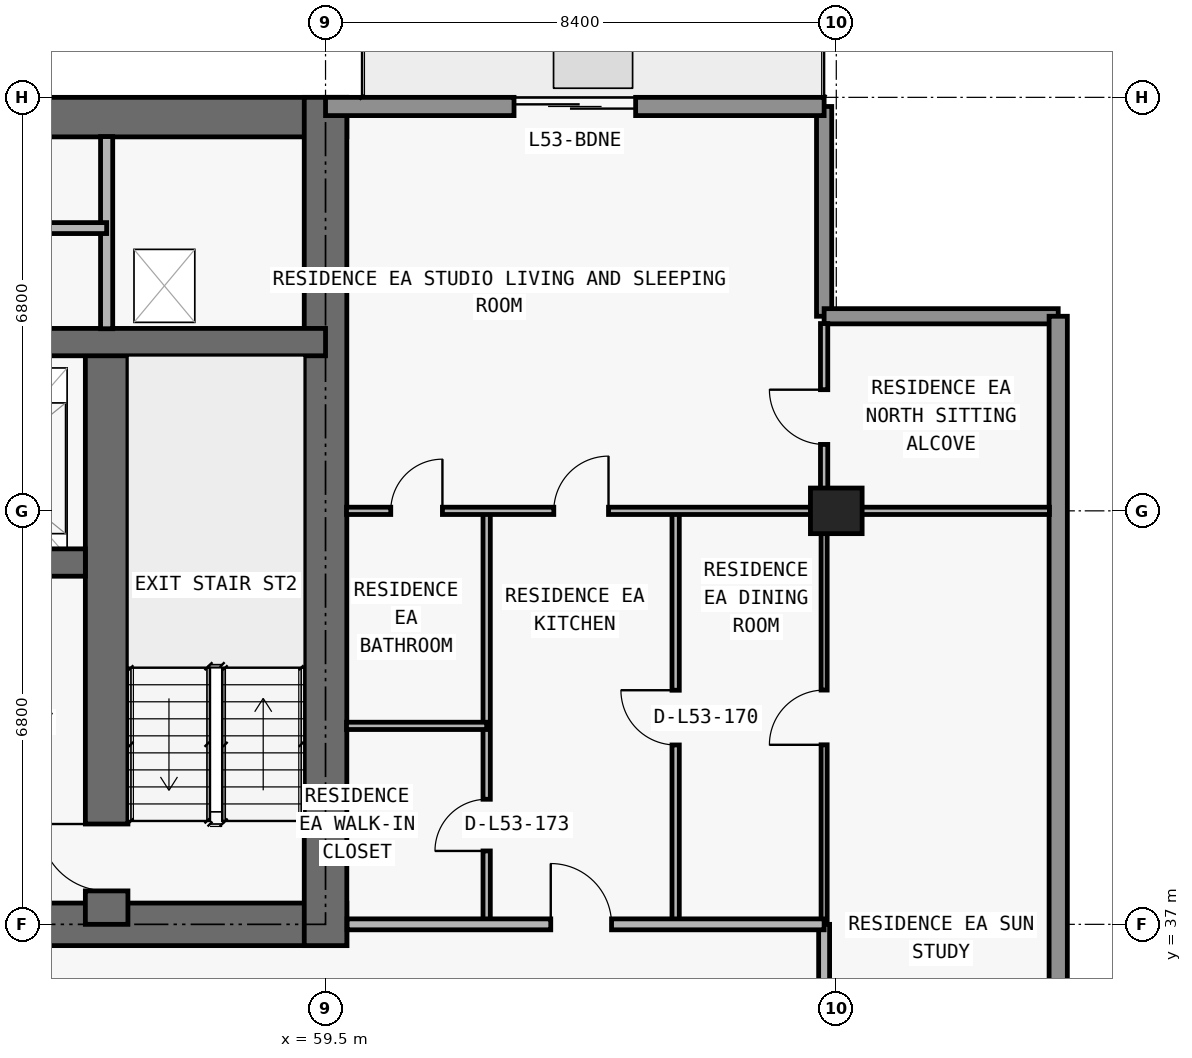
"""IFC4 building model, lengths in metres.
Left out: names, types, materials, properties, quantities, classifications, styles, units other than length and angle.
Written with IfcOpenShell. Run it as: python <this file> out.ifc"""

import sys

from ifc_helpers import new_model, si_unit, direction, frame, frame_2d, origin, origin_2d, place, context, subcontext, project, spatial, rectangle, extrude, element, fill, save


model = new_model("IFC4")
c1 = context("Model", 3, precision=1e-05, world=origin(), true_north=direction((0.0, 1.0)))
c2 = subcontext(c1, "Body", "Model", "MODEL_VIEW")
j1 = project(units=[si_unit("LENGTHUNIT", "METRE"), si_unit("PLANEANGLEUNIT", "RADIAN")], contexts=[c1])
p1 = place(None, origin())
s1 = spatial("IfcSite", under=j1, at=p1, CompositionType="ELEMENT")
p2 = place(p1, origin())
s2 = spatial("IfcBuilding", under=s1, at=p2, CompositionType="ELEMENT")
p3 = place(p2, frame((0.0, 0.0, 191.7)))
s3 = spatial("IfcBuildingStorey", under=s2, at=p3, CompositionType="ELEMENT", Elevation=191.7)
p4 = place(p3, frame((67.9, 43.8, 0.0), z_axis=(0.0, 0.0, 1.0), x_axis=(1.0, 0.0, 0.0)))
e1 = element("IfcColumn", 1, at=p4, inside=s3, PredefinedType="COLUMN", context=c2, shape_type="SweptSolid", body=[
    extrude(rectangle(XDim=0.85, YDim=0.75, at=origin_2d()), origin(), (0.0, 0.0, 1.0), 3.05),
])
p5 = place(p3, frame((17.95, 37.0, 0.0), z_axis=(0.0, 0.0, 1.0), x_axis=(1.0, 0.0, 0.0)))
e2 = element("IfcWall", 2, at=p5, inside=s3, PredefinedType="SHEAR", context=c2, shape_type="SweptSolid", body=[
    extrude(rectangle(XDim=41.9, YDim=0.7, at=frame_2d((20.95, 0.0))), origin(), (0.0, 0.0, 1.0), 3.05),
])
p6 = place(p5, frame((14.35, 0.0, 0.0)))
e3 = element("IfcOpeningElement", 3, at=p6, cuts=e2, PredefinedType="OPENING", context=c2, shape_type="SweptSolid", body=[
    extrude(rectangle(XDim=1.1, YDim=2.15, at=frame_2d((0.55, 1.075))), frame((0.0, 0.36, 0.0), z_axis=(0.0, -1.0, 0.0), x_axis=(1.0, 0.0, 0.0)), (0.0, 0.0, 1.0), 0.72),
])
p7 = place(p5, frame((6.2, 0.0, 0.0)))
e4 = element("IfcOpeningElement", 4, at=p7, cuts=e2, PredefinedType="OPENING", context=c2, shape_type="SweptSolid", body=[
    extrude(rectangle(XDim=1.05, YDim=2.15, at=frame_2d((0.525, 1.075))), frame((0.0, 0.36, 0.0), z_axis=(0.0, -1.0, 0.0), x_axis=(1.0, 0.0, 0.0)), (0.0, 0.0, 1.0), 0.72),
])
p8 = place(p5, frame((34.7, 0.0, 0.0)))
e5 = element("IfcOpeningElement", 5, at=p8, cuts=e2, PredefinedType="OPENING", context=c2, shape_type="SweptSolid", body=[
    extrude(rectangle(XDim=1.05, YDim=2.15, at=frame_2d((0.525, 1.075))), frame((0.0, 0.36, 0.0), z_axis=(0.0, -1.0, 0.0), x_axis=(1.0, 0.0, 0.0)), (0.0, 0.0, 1.0), 0.72),
])
p9 = place(p5, frame((10.812, 0.0, 0.0)))
e6 = element("IfcOpeningElement", 6, at=p9, cuts=e2, PredefinedType="OPENING", context=c2, shape_type="SweptSolid", body=[
    extrude(rectangle(XDim=1.05, YDim=2.15, at=frame_2d((0.525, 1.075))), frame((0.0, 0.36, 0.0), z_axis=(0.0, -1.0, 0.0), x_axis=(1.0, 0.0, 0.0)), (0.0, 0.0, 1.0), 0.72),
])
p10 = place(p5, frame((24.05, 0.0, 0.0)))
e7 = element("IfcOpeningElement", 7, at=p10, cuts=e2, PredefinedType="OPENING", context=c2, shape_type="SweptSolid", body=[
    extrude(rectangle(XDim=1.05, YDim=2.15, at=frame_2d((0.525, 1.075))), frame((0.0, 0.36, 0.0), z_axis=(0.0, -1.0, 0.0), x_axis=(1.0, 0.0, 0.0)), (0.0, 0.0, 1.0), 0.72),
])
p11 = place(p3, frame((17.95, 50.275, 0.0), z_axis=(0.0, 0.0, 1.0), x_axis=(1.0, 0.0, 0.0)))
e8 = element("IfcWall", 8, at=p11, inside=s3, PredefinedType="SHEAR", context=c2, shape_type="SweptSolid", body=[
    extrude(rectangle(XDim=41.9, YDim=0.65, at=frame_2d((20.95, 0.0))), origin(), (0.0, 0.0, 1.0), 3.05),
])
p12 = place(p3, frame((59.5, 36.65, 0.0), z_axis=(0.0, 0.0, 1.0), x_axis=(0.0, 1.0, 0.0)))
e9 = element("IfcWall", 9, at=p12, inside=s3, PredefinedType="SHEAR", context=c2, shape_type="SweptSolid", body=[
    extrude(rectangle(XDim=13.95, YDim=0.7, at=frame_2d((6.975, 0.0))), origin(), (0.0, 0.0, 1.0), 3.05),
])
p13 = place(p3, frame((55.9, 37.0, 0.0), z_axis=(0.0, 0.0, 1.0), x_axis=(0.0, 1.0, 0.0)))
e10 = element("IfcWall", 10, at=p13, inside=s3, PredefinedType="SHEAR", context=c2, shape_type="SweptSolid", body=[
    extrude(rectangle(XDim=9.575, YDim=0.7, at=frame_2d((4.788, 0.0))), origin(), (0.0, 0.0, 1.0), 3.05),
])
p14 = place(p13, frame((0.55, 0.0, 0.0)))
e11 = element("IfcOpeningElement", 11, at=p14, cuts=e10, PredefinedType="OPENING", context=c2, shape_type="SweptSolid", body=[
    extrude(rectangle(XDim=1.1, YDim=2.15, at=frame_2d((0.55, 1.075))), frame((0.0, 0.36, 0.0), z_axis=(0.0, -1.0, 0.0), x_axis=(1.0, 0.0, 0.0)), (0.0, 0.0, 1.0), 0.72),
])
p15 = place(p3, frame((22.25, 42.95, 0.0), z_axis=(0.0, 0.0, 1.0), x_axis=(1.0, 0.0, 0.0)))
e12 = element("IfcWall", 12, at=p15, inside=s3, PredefinedType="SHEAR", context=c2, shape_type="SweptSolid", body=[
    extrude(rectangle(XDim=33.3, YDim=0.45, at=frame_2d((16.65, 0.0))), origin(), (0.0, 0.0, 1.0), 3.05),
])
p16 = place(p15, frame((1.05, 0.0, 0.0)))
e13 = element("IfcOpeningElement", 13, at=p16, cuts=e12, PredefinedType="OPENING", context=c2, shape_type="SweptSolid", body=[
    extrude(rectangle(XDim=1.2, YDim=2.2, at=frame_2d((0.6, 1.1))), frame((0.0, 0.235, 0.0), z_axis=(0.0, -1.0, 0.0), x_axis=(1.0, 0.0, 0.0)), (0.0, 0.0, 1.0), 0.47),
])
p17 = place(p15, frame((31.05, 0.0, 0.0)))
e14 = element("IfcOpeningElement", 14, at=p17, cuts=e12, PredefinedType="OPENING", context=c2, shape_type="SweptSolid", body=[
    extrude(rectangle(XDim=1.2, YDim=2.2, at=frame_2d((0.6, 1.1))), frame((0.0, 0.235, 0.0), z_axis=(0.0, -1.0, 0.0), x_axis=(1.0, 0.0, 0.0)), (0.0, 0.0, 1.0), 0.47),
])
p18 = place(p15, frame((26.45, 0.0, 0.0)))
e15 = element("IfcOpeningElement", 15, at=p18, cuts=e12, PredefinedType="OPENING", context=c2, shape_type="SweptSolid", body=[
    extrude(rectangle(XDim=1.1, YDim=2.2, at=frame_2d((0.55, 1.1))), frame((0.0, 0.235, 0.0), z_axis=(0.0, -1.0, 0.0), x_axis=(1.0, 0.0, 0.0)), (0.0, 0.0, 1.0), 0.47),
])
p19 = place(p15, frame((5.95, 0.0, 0.0)))
e16 = element("IfcOpeningElement", 16, at=p19, cuts=e12, PredefinedType="OPENING", context=c2, shape_type="SweptSolid", body=[
    extrude(rectangle(XDim=1.1, YDim=2.2, at=frame_2d((0.55, 1.1))), frame((0.0, 0.235, 0.0), z_axis=(0.0, -1.0, 0.0), x_axis=(1.0, 0.0, 0.0)), (0.0, 0.0, 1.0), 0.47),
])
p20 = place(p15, frame((3.625, 0.0, 0.0)))
e17 = element("IfcOpeningElement", 17, at=p20, cuts=e12, PredefinedType="OPENING", context=c2, shape_type="SweptSolid", body=[
    extrude(rectangle(XDim=1.05, YDim=2.15, at=frame_2d((0.525, 1.075))), frame((0.0, 0.235, 0.0), z_axis=(0.0, -1.0, 0.0), x_axis=(1.0, 0.0, 0.0)), (0.0, 0.0, 1.0), 0.47),
])
p21 = place(p15, frame((28.675, 0.0, 0.0)))
e18 = element("IfcOpeningElement", 18, at=p21, cuts=e12, PredefinedType="OPENING", context=c2, shape_type="SweptSolid", body=[
    extrude(rectangle(XDim=1.05, YDim=2.15, at=frame_2d((0.525, 1.075))), frame((0.0, 0.235, 0.0), z_axis=(0.0, -1.0, 0.0), x_axis=(1.0, 0.0, 0.0)), (0.0, 0.0, 1.0), 0.47),
])
p22 = place(p15, frame((15.225, 0.0, 0.0)))
e19 = element("IfcOpeningElement", 19, at=p22, cuts=e12, PredefinedType="OPENING", context=c2, shape_type="SweptSolid", body=[
    extrude(rectangle(XDim=1.0, YDim=2.2, at=frame_2d((0.5, 1.1))), frame((0.0, 0.235, 0.0), z_axis=(0.0, -1.0, 0.0), x_axis=(1.0, 0.0, 0.0)), (0.0, 0.0, 1.0), 0.47),
])
p23 = place(p15, frame((21.975, 0.0, 0.0)))
e20 = element("IfcOpeningElement", 20, at=p23, cuts=e12, PredefinedType="OPENING", context=c2, shape_type="SweptSolid", body=[
    extrude(rectangle(XDim=1.0, YDim=2.2, at=frame_2d((0.5, 1.1))), frame((0.0, 0.235, 0.0), z_axis=(0.0, -1.0, 0.0), x_axis=(1.0, 0.0, 0.0)), (0.0, 0.0, 1.0), 0.47),
])
p24 = place(p3, frame((18.3, 46.575, 0.0), z_axis=(0.0, 0.0, 1.0), x_axis=(1.0, 0.0, 0.0)))
e21 = element("IfcWall", 21, at=p24, inside=s3, PredefinedType="SHEAR", context=c2, shape_type="SweptSolid", body=[
    extrude(rectangle(XDim=41.2, YDim=0.45, at=frame_2d((20.6, 0.0))), origin(), (0.0, 0.0, 1.0), 3.05),
])
p25 = place(p24, frame((7.575, 0.0, 0.0)))
e22 = element("IfcOpeningElement", 22, at=p25, cuts=e21, PredefinedType="OPENING", context=c2, shape_type="SweptSolid", body=[
    extrude(rectangle(XDim=1.05, YDim=2.15, at=frame_2d((0.525, 1.075))), frame((0.0, 0.235, 0.0), z_axis=(0.0, -1.0, 0.0), x_axis=(1.0, 0.0, 0.0)), (0.0, 0.0, 1.0), 0.47),
])
p26 = place(p24, frame((32.625, 0.0, 0.0)))
e23 = element("IfcOpeningElement", 23, at=p26, cuts=e21, PredefinedType="OPENING", context=c2, shape_type="SweptSolid", body=[
    extrude(rectangle(XDim=1.05, YDim=2.15, at=frame_2d((0.525, 1.075))), frame((0.0, 0.235, 0.0), z_axis=(0.0, -1.0, 0.0), x_axis=(1.0, 0.0, 0.0)), (0.0, 0.0, 1.0), 0.47),
])
p27 = place(p3, frame((67.7, 50.45, 0.0), z_axis=(0.0, 0.0, 1.0), x_axis=(0.0, -1.0, 0.0)))
e24 = element("IfcWall", 24, at=p27, inside=s3, PredefinedType="ELEMENTEDWALL", context=c2, shape_type="SweptSolid", body=[
    extrude(rectangle(XDim=3.45, YDim=0.25, at=frame_2d((1.725, 0.0))), origin(), (0.0, 0.0, 1.0), 3.05),
])
p28 = place(p3, frame((67.7, 47.0, 0.0), z_axis=(0.0, 0.0, 1.0), x_axis=(1.0, 0.0, 0.0)))
e25 = element("IfcWall", 25, at=p28, inside=s3, PredefinedType="ELEMENTEDWALL", context=c2, shape_type="SweptSolid", body=[
    extrude(rectangle(XDim=3.85, YDim=0.25, at=frame_2d((1.925, 0.0))), origin(), (0.0, 0.0, 1.0), 3.05),
])
p29 = place(p3, frame((71.55, 47.0, 0.0), z_axis=(0.0, 0.0, 1.0), x_axis=(0.0, -1.0, 0.0)))
e26 = element("IfcWall", 26, at=p29, inside=s3, PredefinedType="STANDARD", context=c2, shape_type="SweptSolid", body=[
    extrude(rectangle(XDim=17.9, YDim=0.3, at=frame_2d((8.95, 0.0))), origin(), (0.0, 0.0, 1.0), 3.05),
])
p30 = place(p3, frame((59.5, 50.45, 0.0), z_axis=(0.0, 0.0, 1.0), x_axis=(1.0, 0.0, 0.0)))
e27 = element("IfcWall", 27, at=p30, inside=s3, PredefinedType="STANDARD", context=c2, shape_type="SweptSolid", body=[
    extrude(rectangle(XDim=8.2, YDim=0.3, at=frame_2d((4.1, 0.0))), origin(), (0.0, 0.0, 1.0), 3.05),
])
p31 = place(p30, frame((3.1, 0.0, 0.0)))
e28 = element("IfcOpeningElement", 28, at=p31, cuts=e27, PredefinedType="OPENING", context=c2, shape_type="SweptSolid", body=[
    extrude(rectangle(XDim=2.0, YDim=2.3, at=frame_2d((1.0, 1.15))), frame((0.0, 0.16, 0.0), z_axis=(0.0, -1.0, 0.0), x_axis=(1.0, 0.0, 0.0)), (0.0, 0.0, 1.0), 0.32),
])
p32 = place(p3, frame((55.9, 46.795, 0.0), z_axis=(0.0, 0.0, 1.0), x_axis=(0.0, 1.0, 0.0)))
e29 = element("IfcWall", 29, at=p32, inside=s3, PredefinedType="PARTITIONING", context=c2, shape_type="SweptSolid", body=[
    extrude(rectangle(XDim=3.16, YDim=0.2, at=frame_2d((1.58, 0.0))), origin(), (0.0, 0.0, 1.0), 3.05),
])
p33 = place(p3, frame((62.15, 37.0, 0.0), z_axis=(0.0, 0.0, 1.0), x_axis=(0.0, 1.0, 0.0)))
e30 = element("IfcWall", 30, at=p33, inside=s3, PredefinedType="PARTITIONING", context=c2, shape_type="SweptSolid", body=[
    extrude(rectangle(XDim=6.8, YDim=0.12, at=frame_2d((3.4, 0.0))), origin(), (0.0, 0.0, 1.0), 3.05),
])
p34 = place(p33, frame((1.207, 0.0, 0.0)))
e31 = element("IfcOpeningElement", 31, at=p34, cuts=e30, PredefinedType="OPENING", context=c2, shape_type="SweptSolid", body=[
    extrude(rectangle(XDim=0.85, YDim=2.1, at=frame_2d((0.425, 1.05))), frame((0.0, 0.07, 0.0), z_axis=(0.0, -1.0, 0.0), x_axis=(1.0, 0.0, 0.0)), (0.0, 0.0, 1.0), 0.14),
])
p35 = place(p3, frame((65.258, 37.0, 0.0), z_axis=(0.0, 0.0, 1.0), x_axis=(0.0, 1.0, 0.0)))
e32 = element("IfcWall", 32, at=p35, inside=s3, PredefinedType="PARTITIONING", context=c2, shape_type="SweptSolid", body=[
    extrude(rectangle(XDim=6.8, YDim=0.12, at=frame_2d((3.4, 0.0))), origin(), (0.0, 0.0, 1.0), 3.05),
])
p36 = place(p35, frame((2.95, 0.0, 0.0)))
e33 = element("IfcOpeningElement", 33, at=p36, cuts=e32, PredefinedType="OPENING", context=c2, shape_type="SweptSolid", body=[
    extrude(rectangle(XDim=0.9, YDim=2.15, at=frame_2d((0.45, 1.075))), frame((0.0, 0.07, 0.0), z_axis=(0.0, -1.0, 0.0), x_axis=(1.0, 0.0, 0.0)), (0.0, 0.0, 1.0), 0.14),
])
p37 = place(p3, frame((67.7, 33.505, 0.0), z_axis=(0.0, 0.0, 1.0), x_axis=(0.0, 1.0, 0.0)))
e34 = element("IfcWall", 34, at=p37, inside=s3, PredefinedType="PARTITIONING", context=c2, shape_type="SweptSolid", body=[
    extrude(rectangle(XDim=3.495, YDim=0.18, at=frame_2d((1.748, 0.0))), origin(), (0.0, 0.0, 1.0), 2.263),
])
p38 = place(p3, frame((67.7, 37.005, 0.0), z_axis=(0.0, 0.0, 1.0), x_axis=(0.0, 1.0, 0.0)))
e35 = element("IfcWall", 35, at=p38, inside=s3, PredefinedType="MOVABLE", context=c2, shape_type="SweptSolid", body=[
    extrude(rectangle(XDim=6.795, YDim=0.1, at=frame_2d((3.397, 0.0))), origin(), (0.0, 0.0, 1.0), 2.263),
])
p39 = place(p38, frame((2.948, 0.0, 0.0)))
e36 = element("IfcOpeningElement", 36, at=p39, cuts=e35, PredefinedType="OPENING", context=c2, shape_type="SweptSolid", body=[
    extrude(rectangle(XDim=0.9, YDim=2.15, at=frame_2d((0.45, 1.075))), frame((0.0, 0.06, 0.0), z_axis=(0.0, -1.0, 0.0), x_axis=(1.0, 0.0, 0.0)), (0.0, 0.0, 1.0), 0.12),
])
p40 = place(p3, frame((67.7, 43.805, 0.0), z_axis=(0.0, 0.0, 1.0), x_axis=(0.0, 1.0, 0.0)))
e37 = element("IfcWall", 37, at=p40, inside=s3, PredefinedType="PARTITIONING", context=c2, shape_type="SweptSolid", body=[
    extrude(rectangle(XDim=3.075, YDim=0.12, at=frame_2d((1.538, 0.0))), origin(), (0.0, 0.0, 1.0), 3.05),
])
p41 = place(p40, frame((1.087, 0.0, 0.0)))
e38 = element("IfcOpeningElement", 38, at=p41, cuts=e37, PredefinedType="OPENING", context=c2, shape_type="SweptSolid", body=[
    extrude(rectangle(XDim=0.9, YDim=2.15, at=frame_2d((0.45, 1.075))), frame((0.0, 0.07, 0.0), z_axis=(0.0, -1.0, 0.0), x_axis=(1.0, 0.0, 0.0)), (0.0, 0.0, 1.0), 0.14),
])
p42 = place(p3, frame((59.855, 37.0, 0.0), z_axis=(0.0, 0.0, 1.0), x_axis=(1.0, 0.0, 0.0)))
e39 = element("IfcWall", 39, at=p42, inside=s3, PredefinedType="PARTITIONING", context=c2, shape_type="SweptSolid", body=[
    extrude(rectangle(XDim=7.845, YDim=0.18, at=frame_2d((3.922, 0.0))), origin(), (0.0, 0.0, 1.0), 3.05),
])
p43 = place(p42, frame((3.349, 0.0, 0.0)))
e40 = element("IfcOpeningElement", 40, at=p43, cuts=e39, PredefinedType="OPENING", context=c2, shape_type="SweptSolid", body=[
    extrude(rectangle(XDim=1.0, YDim=2.2, at=frame_2d((0.5, 1.1))), frame((0.0, 0.1, 0.0), z_axis=(0.0, -1.0, 0.0), x_axis=(1.0, 0.0, 0.0)), (0.0, 0.0, 1.0), 0.2),
])
p44 = place(p3, frame((59.845, 40.264, 0.0), z_axis=(0.0, 0.0, 1.0), x_axis=(1.0, 0.0, 0.0)))
e41 = element("IfcWall", 41, at=p44, inside=s3, PredefinedType="PARTITIONING", context=c2, shape_type="SweptSolid", body=[
    extrude(rectangle(XDim=2.305, YDim=0.12, at=frame_2d((1.152, 0.0))), origin(), (0.0, 0.0, 1.0), 3.05),
])
p45 = place(p3, frame((59.845, 43.8, 0.0), z_axis=(0.0, 0.0, 1.0), x_axis=(1.0, 0.0, 0.0)))
e42 = element("IfcWall", 42, at=p45, inside=s3, PredefinedType="PARTITIONING", context=c2, shape_type="SweptSolid", body=[
    extrude(rectangle(XDim=11.56, YDim=0.12, at=frame_2d((5.78, 0.0))), origin(), (0.0, 0.0, 1.0), 2.418),
])
p46 = place(p45, frame((3.409, 0.0, 0.0)))
e43 = element("IfcOpeningElement", 43, at=p46, cuts=e42, PredefinedType="OPENING", context=c2, shape_type="SweptSolid", body=[
    extrude(rectangle(XDim=0.9, YDim=2.15, at=frame_2d((0.45, 1.075))), frame((0.0, 0.07, 0.0), z_axis=(0.0, -1.0, 0.0), x_axis=(1.0, 0.0, 0.0)), (0.0, 0.0, 1.0), 0.14),
])
p47 = place(p45, frame((0.728, 0.0, 0.0)))
e44 = element("IfcOpeningElement", 44, at=p47, cuts=e42, PredefinedType="OPENING", context=c2, shape_type="SweptSolid", body=[
    extrude(rectangle(XDim=0.85, YDim=2.1, at=frame_2d((0.425, 1.05))), frame((0.0, 0.07, 0.0), z_axis=(0.0, -1.0, 0.0), x_axis=(1.0, 0.0, 0.0)), (0.0, 0.0, 1.0), 0.14),
])
p48 = place(p3, frame((31.4, 48.45, 0.0), z_axis=(0.0, 0.0, 1.0), x_axis=(1.0, 0.0, 0.0)))
e45 = element("IfcWall", 45, at=p48, inside=s3, PredefinedType="PARTITIONING", context=c2, shape_type="SweptSolid", body=[
    extrude(rectangle(XDim=24.5, YDim=0.18, at=frame_2d((12.25, 0.0))), origin(), (0.0, 0.0, 1.0), 3.05),
])
p49 = place(p48, frame((1.775, 0.0, 0.0)))
e46 = element("IfcOpeningElement", 46, at=p49, cuts=e45, PredefinedType="OPENING", context=c2, shape_type="SweptSolid", body=[
    extrude(rectangle(XDim=1.2, YDim=2.2, at=frame_2d((0.6, 1.1))), frame((0.0, 0.1, 0.0), z_axis=(0.0, -1.0, 0.0), x_axis=(1.0, 0.0, 0.0)), (0.0, 0.0, 1.0), 0.2),
])
p50 = place(p48, frame((9.35, 0.0, 0.0)))
e47 = element("IfcOpeningElement", 47, at=p50, cuts=e45, PredefinedType="OPENING", context=c2, shape_type="SweptSolid", body=[
    extrude(rectangle(XDim=1.0, YDim=2.2, at=frame_2d((0.5, 1.1))), frame((0.0, 0.1, 0.0), z_axis=(0.0, -1.0, 0.0), x_axis=(1.0, 0.0, 0.0)), (0.0, 0.0, 1.0), 0.2),
])
p51 = place(p48, frame((16.725, 0.0, 0.0)))
e48 = element("IfcOpeningElement", 48, at=p51, cuts=e45, PredefinedType="OPENING", context=c2, shape_type="SweptSolid", body=[
    extrude(rectangle(XDim=1.2, YDim=2.2, at=frame_2d((0.6, 1.1))), frame((0.0, 0.1, 0.0), z_axis=(0.0, -1.0, 0.0), x_axis=(1.0, 0.0, 0.0)), (0.0, 0.0, 1.0), 0.2),
])
p52 = place(p48, frame((21.675, 0.0, 0.0)))
e49 = element("IfcOpeningElement", 49, at=p52, cuts=e45, PredefinedType="OPENING", context=c2, shape_type="SweptSolid", body=[
    extrude(rectangle(XDim=0.85, YDim=2.1, at=frame_2d((0.425, 1.05))), frame((0.0, 0.1, 0.0), z_axis=(0.0, -1.0, 0.0), x_axis=(1.0, 0.0, 0.0)), (0.0, 0.0, 1.0), 0.2),
])
p53 = place(p31, origin())
e50 = element("IfcDoor", 50, at=p53, inside=s3, OperationType="DOUBLE_DOOR_SLIDING", PredefinedType="DOOR", context=c2, shape_type="SweptSolid", body=[
    extrude(rectangle(XDim=2.0, YDim=2.3, at=frame_2d((1.0, 1.15))), frame((0.0, 0.025, 0.0), z_axis=(0.0, -1.0, 0.0), x_axis=(1.0, 0.0, 0.0)), (0.0, 0.0, 1.0), 0.05),
])
fill(e28, e50)
p54 = place(p14, origin())
e51 = element("IfcDoor", 51, at=p54, inside=s3, OperationType="SINGLE_SWING_RIGHT", PredefinedType="DOOR", context=c2, shape_type="SweptSolid", body=[
    extrude(rectangle(XDim=1.1, YDim=2.15, at=frame_2d((0.55, 1.075))), frame((0.0, 0.025, 0.0), z_axis=(0.0, -1.0, 0.0), x_axis=(1.0, 0.0, 0.0)), (0.0, 0.0, 1.0), 0.05),
])
fill(e11, e51)
p55 = place(p36, origin())
e52 = element("IfcDoor", 52, at=p55, inside=s3, OperationType="SINGLE_SWING_RIGHT", PredefinedType="DOOR", context=c2, shape_type="SweptSolid", body=[
    extrude(rectangle(XDim=0.9, YDim=2.15, at=frame_2d((0.45, 1.075))), frame((0.0, 0.025, 0.0), z_axis=(0.0, -1.0, 0.0), x_axis=(1.0, 0.0, 0.0)), (0.0, 0.0, 1.0), 0.05),
])
fill(e33, e52)
p56 = place(p43, origin())
e53 = element("IfcDoor", 53, at=p56, inside=s3, OperationType="SINGLE_SWING_LEFT", PredefinedType="DOOR", context=c2, shape_type="SweptSolid", body=[
    extrude(rectangle(XDim=1.0, YDim=2.2, at=frame_2d((0.5, 1.1))), frame((0.0, 0.025, 0.0), z_axis=(0.0, -1.0, 0.0), x_axis=(1.0, 0.0, 0.0)), (0.0, 0.0, 1.0), 0.05),
])
fill(e40, e53)
p57 = place(p46, origin())
e54 = element("IfcDoor", 54, at=p57, inside=s3, OperationType="SINGLE_SWING_RIGHT", PredefinedType="DOOR", context=c2, shape_type="SweptSolid", body=[
    extrude(rectangle(XDim=0.9, YDim=2.15, at=frame_2d((0.45, 1.075))), frame((0.0, 0.025, 0.0), z_axis=(0.0, -1.0, 0.0), x_axis=(1.0, 0.0, 0.0)), (0.0, 0.0, 1.0), 0.05),
])
fill(e43, e54)
p58 = place(p34, origin())
e55 = element("IfcDoor", 55, at=p58, inside=s3, OperationType="SINGLE_SWING_LEFT", PredefinedType="DOOR", context=c2, shape_type="SweptSolid", body=[
    extrude(rectangle(XDim=0.85, YDim=2.1, at=frame_2d((0.425, 1.05))), frame((0.0, 0.025, 0.0), z_axis=(0.0, -1.0, 0.0), x_axis=(1.0, 0.0, 0.0)), (0.0, 0.0, 1.0), 0.05),
])
fill(e31, e55)
p59 = place(p47, origin())
e56 = element("IfcDoor", 56, at=p59, inside=s3, OperationType="SINGLE_SWING_RIGHT", PredefinedType="DOOR", context=c2, shape_type="SweptSolid", body=[
    extrude(rectangle(XDim=0.85, YDim=2.1, at=frame_2d((0.425, 1.05))), frame((0.0, 0.025, 0.0), z_axis=(0.0, -1.0, 0.0), x_axis=(1.0, 0.0, 0.0)), (0.0, 0.0, 1.0), 0.05),
])
fill(e44, e56)
p60 = place(p39, origin())
e57 = element("IfcDoor", 57, at=p60, inside=s3, OperationType="SINGLE_SWING_LEFT", PredefinedType="DOOR", context=c2, shape_type="SweptSolid", body=[
    extrude(rectangle(XDim=0.9, YDim=2.15, at=frame_2d((0.45, 1.075))), frame((0.0, 0.025, 0.0), z_axis=(0.0, -1.0, 0.0), x_axis=(1.0, 0.0, 0.0)), (0.0, 0.0, 1.0), 0.05),
])
fill(e36, e57)
p61 = place(p41, origin())
e58 = element("IfcDoor", 58, at=p61, inside=s3, OperationType="SINGLE_SWING_RIGHT", PredefinedType="DOOR", context=c2, shape_type="SweptSolid", body=[
    extrude(rectangle(XDim=0.9, YDim=2.15, at=frame_2d((0.45, 1.075))), frame((0.0, 0.025, 0.0), z_axis=(0.0, -1.0, 0.0), x_axis=(1.0, 0.0, 0.0)), (0.0, 0.0, 1.0), 0.05),
])
fill(e38, e58)
save(model, sys.argv[1])
